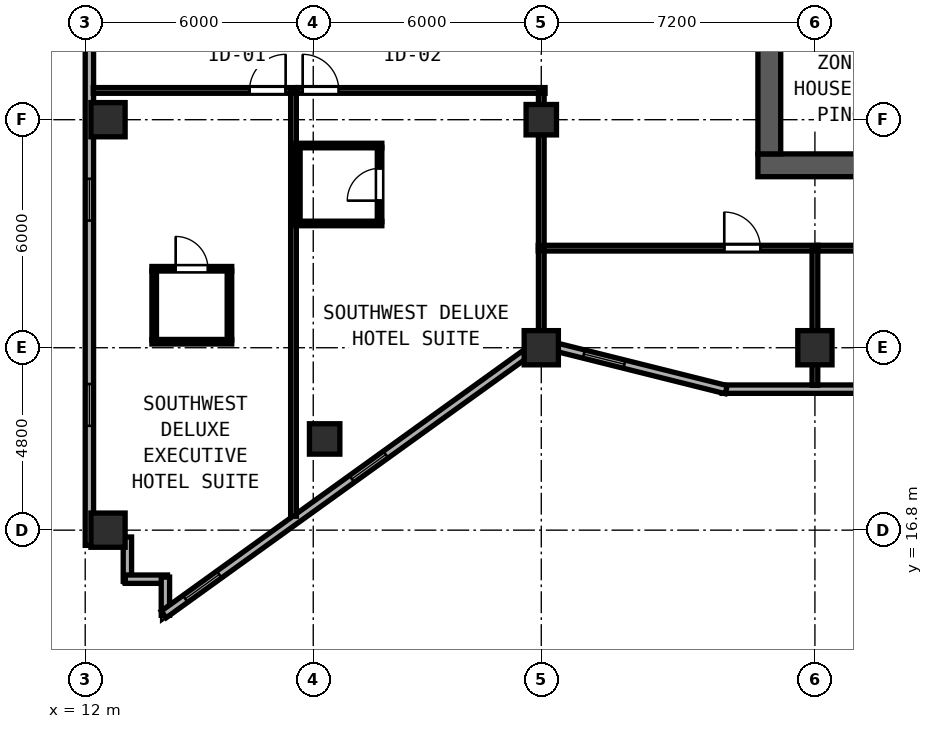
"""IFC4 building model, lengths in metres.
Left out: names, types, materials, properties, quantities, classifications, styles, units other than length and angle.
Written with IfcOpenShell. Run it as: python <this file> out.ifc"""

import sys

from ifc_helpers import new_model, si_unit, direction, frame, frame_2d, origin, origin_2d, place, context, subcontext, project, spatial, rectangle, hollow_rectangle, extrude, element, fill, save


model = new_model("IFC4")
c1 = context("Model", 3, precision=1e-05, world=origin(), true_north=direction((0.0, 1.0)))
c2 = subcontext(c1, "Body", "Model", "MODEL_VIEW")
j1 = project(units=[si_unit("LENGTHUNIT", "METRE"), si_unit("PLANEANGLEUNIT", "RADIAN")], contexts=[c1])
p1 = place(None, origin())
s1 = spatial("IfcSite", under=j1, at=p1, CompositionType="ELEMENT")
p2 = place(p1, origin())
s2 = spatial("IfcBuilding", under=s1, at=p2, CompositionType="ELEMENT")
p3 = place(p2, frame((0.0, 0.0, 176.6)))
s3 = spatial("IfcBuildingStorey", under=s2, at=p3, CompositionType="ELEMENT", Elevation=176.6)
p4 = place(p3, frame((29.7, 26.4, 0.0), z_axis=(0.0, 0.0, 1.0), x_axis=(1.0, 0.0, 0.0)))
e1 = element("IfcWall", 1, at=p4, inside=s3, PredefinedType="SHEAR", context=c2, shape_type="SweptSolid", body=[
    extrude(rectangle(XDim=17.4, YDim=0.6, at=frame_2d((8.7, 0.0))), origin(), (0.0, 0.0, 1.0), 3.62),
])
p5 = place(p4, frame((11.25, 0.0, 0.0), z_axis=(0.0, 0.0, 1.0), x_axis=(-1.0, 0.0, 0.0)))
e2 = element("IfcOpeningElement", 2, at=p5, cuts=e1, PredefinedType="OPENING", context=c2, shape_type="SweptSolid", body=[
    extrude(rectangle(XDim=0.9, YDim=2.1, at=frame_2d((0.45, 1.05))), frame((0.0, 0.31, 0.0), z_axis=(0.0, -1.0, 0.0), x_axis=(1.0, 0.0, 0.0)), (0.0, 0.0, 1.0), 0.62),
])
p6 = place(p3, frame((30.0, 26.7, 0.0), z_axis=(0.0, 0.0, 1.0), x_axis=(0.0, 1.0, 0.0)))
e3 = element("IfcWall", 3, at=p6, inside=s3, PredefinedType="SHEAR", context=c2, shape_type="SweptSolid", body=[
    extrude(rectangle(XDim=4.15, YDim=0.6, at=frame_2d((2.075, 0.0))), origin(), (0.0, 0.0, 1.0), 3.62),
])
for number, where, z_axis, x_axis in (
    (4, (24.0, 21.6, 0.0), (0.0, 0.0, 1.0), (1.0, 0.0, 0.0)),
    (5, (31.2, 21.6, 0.0), (0.0, 0.0, 1.0), (1.0, 0.0, 0.0)),
    (6, (12.6, 16.8, 0.0), (0.0, 0.0, 1.0), (1.0, 0.0, 0.0)),
    (7, (12.6, 27.6, 0.0), (0.0, 0.0, 1.0), (1.0, 0.0, 0.0)),
):
    element("IfcColumn", number, at=place(p3, frame(where, z_axis=z_axis, x_axis=x_axis)), inside=s3, PredefinedType="COLUMN", context=c2, shape_type="SweptSolid", body=[
        extrude(hollow_rectangle(XDim=0.9, YDim=0.9, WallThickness=0.034, at=origin_2d()), origin(), (0.0, 0.0, 1.0), 3.8),
    ])
for number, where, z_axis, x_axis in (
    (8, (24.0, 27.6, 0.0), (0.0, 0.0, 1.0), (1.0, 0.0, 0.0)),
    (9, (18.3, 19.2, 0.0), (0.0, 0.0, 1.0), (1.0, 0.0, 0.0)),
):
    element("IfcColumn", number, at=place(p3, frame(where, z_axis=z_axis, x_axis=x_axis)), inside=s3, PredefinedType="COLUMN", context=c2, shape_type="SweptSolid", body=[
        extrude(hollow_rectangle(XDim=0.8, YDim=0.8, WallThickness=0.03, at=origin_2d()), origin(), (0.0, 0.0, 1.0), 3.8),
    ])
p7 = place(p3, frame((28.759, 20.51, 0.0), z_axis=(0.0, 0.0, 1.0), x_axis=(1.0, 0.0, 0.0)))
e10 = element("IfcWall", 10, at=p7, inside=s3, PredefinedType="SOLIDWALL", context=c2, shape_type="SweptSolid", body=[
    extrude(rectangle(XDim=19.283, YDim=0.22, at=frame_2d((9.642, 0.0))), origin(), (0.0, 0.0, 1.0), 3.62),
])
p8 = place(p7, frame((15.641, 0.0, 0.0), z_axis=(0.0, 0.0, 1.0), x_axis=(-1.0, 0.0, 0.0)))
e11 = element("IfcOpeningElement", 11, at=p8, cuts=e10, PredefinedType="OPENING", context=c2, shape_type="SweptSolid", body=[
    extrude(rectangle(XDim=1.2, YDim=2.15, at=frame_2d((0.6, 1.075))), frame((0.0, 0.12, 0.0), z_axis=(0.0, -1.0, 0.0), x_axis=(1.0, 0.0, 0.0)), (0.0, 0.0, 1.0), 0.24),
])
p9 = place(p3, frame((12.11, 37.545, 0.0), z_axis=(0.0, 0.0, 1.0), x_axis=(0.0, -1.0, 0.0)))
e12 = element("IfcWall", 12, at=p9, inside=s3, PredefinedType="SOLIDWALL", context=c2, shape_type="SweptSolid", body=[
    extrude(rectangle(XDim=21.145, YDim=0.22, at=frame_2d((10.573, 0.0))), origin(), (0.0, 0.0, 1.0), 3.62),
])
p10 = place(p9, frame((0.7, 0.0, 0.85)))
e13 = element("IfcOpeningElement", 13, at=p10, cuts=e12, PredefinedType="OPENING", context=c2, shape_type="SweptSolid", body=[
    extrude(rectangle(XDim=1.1, YDim=1.75, at=frame_2d((0.55, 0.875))), frame((0.0, 0.12, 0.0), z_axis=(0.0, -1.0, 0.0), x_axis=(1.0, 0.0, 0.0)), (0.0, 0.0, 1.0), 0.24),
])
p11 = place(p9, frame((5.83, 0.0, 0.85)))
e14 = element("IfcOpeningElement", 14, at=p11, cuts=e12, PredefinedType="OPENING", context=c2, shape_type="SweptSolid", body=[
    extrude(rectangle(XDim=1.1, YDim=1.75, at=frame_2d((0.55, 0.875))), frame((0.0, 0.12, 0.0), z_axis=(0.0, -1.0, 0.0), x_axis=(1.0, 0.0, 0.0)), (0.0, 0.0, 1.0), 0.24),
])
p12 = place(p9, frame((11.5, 0.0, 0.85)))
e15 = element("IfcOpeningElement", 15, at=p12, cuts=e12, PredefinedType="OPENING", context=c2, shape_type="SweptSolid", body=[
    extrude(rectangle(XDim=1.1, YDim=1.75, at=frame_2d((0.55, 0.875))), frame((0.0, 0.12, 0.0), z_axis=(0.0, -1.0, 0.0), x_axis=(1.0, 0.0, 0.0)), (0.0, 0.0, 1.0), 0.24),
])
p13 = place(p9, frame((16.9, 0.0, 0.85)))
e16 = element("IfcOpeningElement", 16, at=p13, cuts=e12, PredefinedType="OPENING", context=c2, shape_type="SweptSolid", body=[
    extrude(rectangle(XDim=1.1, YDim=1.75, at=frame_2d((0.55, 0.875))), frame((0.0, 0.12, 0.0), z_axis=(0.0, -1.0, 0.0), x_axis=(1.0, 0.0, 0.0)), (0.0, 0.0, 1.0), 0.24),
])
p14 = place(p3, frame((13.11, 16.62, 0.0), z_axis=(0.0, 0.0, 1.0), x_axis=(0.0, -1.0, 0.0)))
e17 = element("IfcWall", 17, at=p14, inside=s3, PredefinedType="SOLIDWALL", context=c2, shape_type="SweptSolid", body=[
    extrude(rectangle(XDim=1.165, YDim=0.22, at=frame_2d((0.583, 0.0))), origin(), (0.0, 0.0, 1.0), 3.62),
])
p15 = place(p3, frame((13.055, 15.51, 0.0), z_axis=(0.0, 0.0, 1.0), x_axis=(1.0, 0.0, 0.0)))
e18 = element("IfcWall", 18, at=p15, inside=s3, PredefinedType="SOLIDWALL", context=c2, shape_type="SweptSolid", body=[
    extrude(rectangle(XDim=1.11, YDim=0.22, at=frame_2d((0.555, 0.0))), origin(), (0.0, 0.0, 1.0), 3.62),
])
p16 = place(p3, frame((14.11, 15.565, 0.0), z_axis=(0.0, 0.0, 1.0), x_axis=(0.0, -1.0, 0.0)))
e19 = element("IfcWall", 19, at=p16, inside=s3, PredefinedType="SOLIDWALL", context=c2, shape_type="SweptSolid", body=[
    extrude(rectangle(XDim=1.005, YDim=0.22, at=frame_2d((0.502, 0.0))), origin(), (0.0, 0.0, 1.0), 3.62),
])
p17 = place(p3, frame((14.065, 14.583, 0.0), z_axis=(0.0, 0.0, 1.0), x_axis=(0.811534737332, 0.58430417601, 0.0)))
e20 = element("IfcWall", 20, at=p17, inside=s3, PredefinedType="SOLIDWALL", context=c2, shape_type="SweptSolid", body=[
    extrude(rectangle(XDim=11.697, YDim=0.22, at=frame_2d((5.849, 0.0))), origin(), (0.0, 0.0, 1.0), 3.215),
])
p18 = place(p17, frame((0.7, 0.0, 0.85)))
e21 = element("IfcOpeningElement", 21, at=p18, cuts=e20, PredefinedType="OPENING", context=c2, shape_type="SweptSolid", body=[
    extrude(rectangle(XDim=1.1, YDim=1.75, at=frame_2d((0.55, 0.875))), frame((0.0, 0.12, 0.0), z_axis=(0.0, -1.0, 0.0), x_axis=(1.0, 0.0, 0.0)), (0.0, 0.0, 1.0), 0.24),
])
p19 = place(p17, frame((6.1, 0.0, 0.85)))
e22 = element("IfcOpeningElement", 22, at=p19, cuts=e20, PredefinedType="OPENING", context=c2, shape_type="SweptSolid", body=[
    extrude(rectangle(XDim=1.1, YDim=1.75, at=frame_2d((0.55, 0.875))), frame((0.0, 0.12, 0.0), z_axis=(0.0, -1.0, 0.0), x_axis=(1.0, 0.0, 0.0)), (0.0, 0.0, 1.0), 0.24),
])
p20 = place(p3, frame((24.442, 21.603, 0.0), z_axis=(0.0, 0.0, 1.0), x_axis=(0.970145648609, -0.242523030833, 0.0)))
e23 = element("IfcWall", 23, at=p20, inside=s3, PredefinedType="SOLIDWALL", context=c2, shape_type="SweptSolid", body=[
    extrude(rectangle(XDim=4.561, YDim=0.22, at=frame_2d((2.281, 0.0))), origin(), (0.0, 0.0, 1.0), 3.215),
])
p21 = place(p20, frame((0.7, 0.0, 0.85)))
e24 = element("IfcOpeningElement", 24, at=p21, cuts=e23, PredefinedType="OPENING", context=c2, shape_type="SweptSolid", body=[
    extrude(rectangle(XDim=1.1, YDim=1.75, at=frame_2d((0.55, 0.875))), frame((0.0, 0.12, 0.0), z_axis=(0.0, -1.0, 0.0), x_axis=(1.0, 0.0, 0.0)), (0.0, 0.0, 1.0), 0.24),
])
p22 = place(p3, frame((23.92, 24.22, 0.0), z_axis=(0.0, 0.0, 1.0), x_axis=(1.0, 0.0, 0.0)))
e25 = element("IfcWall", 25, at=p22, inside=s3, PredefinedType="PARTITIONING", context=c2, shape_type="SweptSolid", body=[
    extrude(rectangle(XDim=7.36, YDim=0.15, at=frame_2d((3.68, 0.0))), origin(), (0.0, 0.0, 1.0), 3.62),
])
p23 = place(p22, frame((5.845, 0.0, 0.0), z_axis=(0.0, 0.0, 1.0), x_axis=(-1.0, 0.0, 0.0)))
e26 = element("IfcOpeningElement", 26, at=p23, cuts=e25, PredefinedType="OPENING", context=c2, shape_type="SweptSolid", body=[
    extrude(rectangle(XDim=0.95, YDim=2.12, at=frame_2d((0.475, 1.06))), frame((0.0, 0.085, 0.0), z_axis=(0.0, -1.0, 0.0), x_axis=(1.0, 0.0, 0.0)), (0.0, 0.0, 1.0), 0.17),
])
p24 = place(p3, frame((24.0, 21.819, 0.0), z_axis=(0.0, 0.0, 1.0), x_axis=(0.0, 1.0, 0.0)))
e27 = element("IfcWall", 27, at=p24, inside=s3, PredefinedType="PARTITIONING", context=c2, shape_type="SweptSolid", body=[
    extrude(rectangle(XDim=2.341, YDim=0.15, at=frame_2d((1.171, 0.0))), origin(), (0.0, 0.0, 1.0), 3.215),
])
p25 = place(p3, frame((31.2, 20.612, 0.0), z_axis=(0.0, 0.0, 1.0), x_axis=(0.0, 1.0, 0.0)))
e28 = element("IfcWall", 28, at=p25, inside=s3, PredefinedType="PARTITIONING", context=c2, shape_type="SweptSolid", body=[
    extrude(rectangle(XDim=3.548, YDim=0.15, at=frame_2d((1.774, 0.0))), origin(), (0.0, 0.0, 1.0), 3.105),
])
p26 = place(p3, frame((31.282, 24.22, 0.0), z_axis=(0.0, 0.0, 1.0), x_axis=(1.0, 0.0, 0.0)))
e29 = element("IfcWall", 29, at=p26, inside=s3, PredefinedType="PARTITIONING", context=c2, shape_type="SweptSolid", body=[
    extrude(rectangle(XDim=14.398, YDim=0.15, at=frame_2d((7.199, 0.0))), origin(), (0.0, 0.0, 1.0), 3.62),
])
p27 = place(p26, frame((7.513, 0.0, 0.0), z_axis=(0.0, 0.0, 1.0), x_axis=(-1.0, 0.0, 0.0)))
e30 = element("IfcOpeningElement", 30, at=p27, cuts=e29, PredefinedType="OPENING", context=c2, shape_type="SweptSolid", body=[
    extrude(rectangle(XDim=0.95, YDim=2.12, at=frame_2d((0.475, 1.06))), frame((0.0, 0.085, 0.0), z_axis=(0.0, -1.0, 0.0), x_axis=(1.0, 0.0, 0.0)), (0.0, 0.0, 1.0), 0.17),
])
p28 = place(p3, frame((12.212, 28.37, 0.0), z_axis=(0.0, 0.0, 1.0), x_axis=(1.0, 0.0, 0.0)))
e31 = element("IfcWall", 31, at=p28, inside=s3, PredefinedType="PARTITIONING", context=c2, shape_type="SweptSolid", body=[
    extrude(rectangle(XDim=5.368, YDim=0.15, at=frame_2d((2.684, 0.0))), origin(), (0.0, 0.0, 1.0), 3.62),
])
p29 = place(p28, frame((5.062, 0.0, 0.0), z_axis=(0.0, 0.0, 1.0), x_axis=(-1.0, 0.0, 0.0)))
e32 = element("IfcOpeningElement", 32, at=p29, cuts=e31, PredefinedType="OPENING", context=c2, shape_type="SweptSolid", body=[
    extrude(rectangle(XDim=0.95, YDim=2.18, at=frame_2d((0.475, 1.09))), frame((0.0, 0.085, 0.0), z_axis=(0.0, -1.0, 0.0), x_axis=(1.0, 0.0, 0.0)), (0.0, 0.0, 1.0), 0.17),
])
p30 = place(p3, frame((17.48, 17.167, 0.0), z_axis=(0.0, 0.0, 1.0), x_axis=(0.0, 1.0, 0.0)))
e33 = element("IfcWall", 33, at=p30, inside=s3, PredefinedType="PARTITIONING", context=c2, shape_type="SweptSolid", body=[
    extrude(rectangle(XDim=11.143, YDim=0.15, at=frame_2d((5.572, 0.0))), origin(), (0.0, 0.0, 1.0), 3.62),
])
p31 = place(p3, frame((13.755, 23.678, 0.0), z_axis=(0.0, 0.0, 1.0), x_axis=(1.0, 0.0, 0.0)))
e34 = element("IfcWall", 34, at=p31, inside=s3, PredefinedType="PARTITIONING", context=c2, shape_type="SweptSolid", body=[
    extrude(rectangle(XDim=2.1, YDim=0.12, at=frame_2d((1.05, 0.0))), origin(), (0.0, 0.0, 1.0), 3.62),
])
p32 = place(p31, frame((1.475, 0.0, 0.0), z_axis=(0.0, 0.0, 1.0), x_axis=(-1.0, 0.0, 0.0)))
e35 = element("IfcOpeningElement", 35, at=p32, cuts=e34, PredefinedType="OPENING", context=c2, shape_type="SweptSolid", body=[
    extrude(rectangle(XDim=0.85, YDim=2.1, at=frame_2d((0.425, 1.05))), frame((0.0, 0.07, 0.0), z_axis=(0.0, -1.0, 0.0), x_axis=(1.0, 0.0, 0.0)), (0.0, 0.0, 1.0), 0.14),
])
p33 = place(p3, frame((13.755, 21.758, 0.0), z_axis=(0.0, 0.0, 1.0), x_axis=(1.0, 0.0, 0.0)))
e36 = element("IfcWall", 36, at=p33, inside=s3, PredefinedType="PARTITIONING", context=c2, shape_type="SweptSolid", body=[
    extrude(rectangle(XDim=2.1, YDim=0.12, at=frame_2d((1.05, 0.0))), origin(), (0.0, 0.0, 1.0), 3.62),
])
for number, where, z_axis, x_axis in (
    (37, (13.815, 21.803, 0.0), (0.0, 0.0, 1.0), (0.0, 1.0, 0.0)),
    (38, (15.795, 21.803, 0.0), (0.0, 0.0, 1.0), (0.0, 1.0, 0.0)),
):
    element("IfcWall", number, at=place(p3, frame(where, z_axis=z_axis, x_axis=x_axis)), inside=s3, PredefinedType="PARTITIONING", context=c2, shape_type="SweptSolid", body=[
        extrude(rectangle(XDim=1.83, YDim=0.12, at=frame_2d((0.915, 0.0))), origin(), (0.0, 0.0, 1.0), 3.62),
    ])
p34 = place(p3, frame((17.582, 28.37, 0.0), z_axis=(0.0, 0.0, 1.0), x_axis=(1.0, 0.0, 0.0)))
e39 = element("IfcWall", 39, at=p34, inside=s3, PredefinedType="PARTITIONING", context=c2, shape_type="SweptSolid", body=[
    extrude(rectangle(XDim=6.518, YDim=0.15, at=frame_2d((3.259, 0.0))), origin(), (0.0, 0.0, 1.0), 3.62),
])
p35 = place(p34, frame((1.09, 0.0, 0.0), z_axis=(0.0, 0.0, 1.0), x_axis=(-1.0, 0.0, 0.0)))
e40 = element("IfcOpeningElement", 40, at=p35, cuts=e39, PredefinedType="OPENING", context=c2, shape_type="SweptSolid", body=[
    extrude(rectangle(XDim=0.95, YDim=2.18, at=frame_2d((0.475, 1.09))), frame((0.0, 0.085, 0.0), z_axis=(0.0, -1.0, 0.0), x_axis=(1.0, 0.0, 0.0)), (0.0, 0.0, 1.0), 0.17),
])
p36 = place(p3, frame((24.0, 24.28, 0.0), z_axis=(0.0, 0.0, 1.0), x_axis=(0.0, 1.0, 0.0)))
e41 = element("IfcWall", 41, at=p36, inside=s3, PredefinedType="PARTITIONING", context=c2, shape_type="SweptSolid", body=[
    extrude(rectangle(XDim=4.03, YDim=0.15, at=frame_2d((2.015, 0.0))), origin(), (0.0, 0.0, 1.0), 3.215),
])
p37 = place(p3, frame((17.54, 26.92, 0.0), z_axis=(0.0, 0.0, 1.0), x_axis=(1.0, 0.0, 0.0)))
e42 = element("IfcWall", 42, at=p37, inside=s3, PredefinedType="PARTITIONING", context=c2, shape_type="SweptSolid", body=[
    extrude(rectangle(XDim=2.265, YDim=0.12, at=frame_2d((1.132, 0.0))), origin(), (0.0, 0.0, 1.0), 3.62),
])
p38 = place(p3, frame((17.54, 24.87, 0.0), z_axis=(0.0, 0.0, 1.0), x_axis=(1.0, 0.0, 0.0)))
e43 = element("IfcWall", 43, at=p38, inside=s3, PredefinedType="PARTITIONING", context=c2, shape_type="SweptSolid", body=[
    extrude(rectangle(XDim=2.265, YDim=0.12, at=frame_2d((1.132, 0.0))), origin(), (0.0, 0.0, 1.0), 3.255),
])
p39 = place(p3, frame((17.595, 24.915, 0.0), z_axis=(0.0, 0.0, 1.0), x_axis=(0.0, 1.0, 0.0)))
e44 = element("IfcWall", 44, at=p39, inside=s3, PredefinedType="PARTITIONING", context=c2, shape_type="SweptSolid", body=[
    extrude(rectangle(XDim=1.96, YDim=0.12, at=frame_2d((0.98, 0.0))), origin(), (0.0, 0.0, 1.0), 3.62),
])
p40 = place(p3, frame((19.745, 24.915, 0.0), z_axis=(0.0, 0.0, 1.0), x_axis=(0.0, 1.0, 0.0)))
e45 = element("IfcWall", 45, at=p40, inside=s3, PredefinedType="PARTITIONING", context=c2, shape_type="SweptSolid", body=[
    extrude(rectangle(XDim=1.96, YDim=0.12, at=frame_2d((0.98, 0.0))), origin(), (0.0, 0.0, 1.0), 3.62),
])
p41 = place(p40, frame((0.555, 0.0, 0.0)))
e46 = element("IfcOpeningElement", 46, at=p41, cuts=e45, PredefinedType="OPENING", context=c2, shape_type="SweptSolid", body=[
    extrude(rectangle(XDim=0.85, YDim=2.1, at=frame_2d((0.425, 1.05))), frame((0.0, 0.07, 0.0), z_axis=(0.0, -1.0, 0.0), x_axis=(1.0, 0.0, 0.0)), (0.0, 0.0, 1.0), 0.14),
])
p42 = place(p12, origin())
e47 = element("IfcWindow", 47, at=p42, inside=s3, PartitioningType="SINGLE_PANEL", PredefinedType="WINDOW", context=c2, shape_type="SweptSolid", body=[
    extrude(rectangle(XDim=1.1, YDim=1.75, at=frame_2d((0.55, 0.875))), frame((0.0, 0.03, 0.0), z_axis=(0.0, -1.0, 0.0), x_axis=(1.0, 0.0, 0.0)), (0.0, 0.0, 1.0), 0.06),
])
fill(e15, e47)
p43 = place(p13, origin())
e48 = element("IfcWindow", 48, at=p43, inside=s3, PartitioningType="SINGLE_PANEL", PredefinedType="WINDOW", context=c2, shape_type="SweptSolid", body=[
    extrude(rectangle(XDim=1.1, YDim=1.75, at=frame_2d((0.55, 0.875))), frame((0.0, 0.03, 0.0), z_axis=(0.0, -1.0, 0.0), x_axis=(1.0, 0.0, 0.0)), (0.0, 0.0, 1.0), 0.06),
])
fill(e16, e48)
p44 = place(p18, origin())
e49 = element("IfcWindow", 49, at=p44, inside=s3, PartitioningType="SINGLE_PANEL", PredefinedType="WINDOW", context=c2, shape_type="SweptSolid", body=[
    extrude(rectangle(XDim=1.1, YDim=1.75, at=frame_2d((0.55, 0.875))), frame((0.0, 0.03, 0.0), z_axis=(0.0, -1.0, 0.0), x_axis=(1.0, 0.0, 0.0)), (0.0, 0.0, 1.0), 0.06),
])
fill(e21, e49)
p45 = place(p19, origin())
e50 = element("IfcWindow", 50, at=p45, inside=s3, PartitioningType="SINGLE_PANEL", PredefinedType="WINDOW", context=c2, shape_type="SweptSolid", body=[
    extrude(rectangle(XDim=1.1, YDim=1.75, at=frame_2d((0.55, 0.875))), frame((0.0, 0.03, 0.0), z_axis=(0.0, -1.0, 0.0), x_axis=(1.0, 0.0, 0.0)), (0.0, 0.0, 1.0), 0.06),
])
fill(e22, e50)
p46 = place(p21, origin())
e51 = element("IfcWindow", 51, at=p46, inside=s3, PartitioningType="SINGLE_PANEL", PredefinedType="WINDOW", context=c2, shape_type="SweptSolid", body=[
    extrude(rectangle(XDim=1.1, YDim=1.75, at=frame_2d((0.55, 0.875))), frame((0.0, 0.03, 0.0), z_axis=(0.0, -1.0, 0.0), x_axis=(1.0, 0.0, 0.0)), (0.0, 0.0, 1.0), 0.06),
])
fill(e24, e51)
p47 = place(p23, origin())
e52 = element("IfcDoor", 52, at=p47, inside=s3, OperationType="SINGLE_SWING_RIGHT", PredefinedType="DOOR", context=c2, shape_type="SweptSolid", body=[
    extrude(rectangle(XDim=0.95, YDim=2.12, at=frame_2d((0.475, 1.06))), frame((0.0, 0.025, 0.0), z_axis=(0.0, -1.0, 0.0), x_axis=(1.0, 0.0, 0.0)), (0.0, 0.0, 1.0), 0.05),
])
fill(e26, e52)
p48 = place(p29, origin())
e53 = element("IfcDoor", 53, at=p48, inside=s3, OperationType="SINGLE_SWING_LEFT", PredefinedType="DOOR", context=c2, shape_type="SweptSolid", body=[
    extrude(rectangle(XDim=0.95, YDim=2.18, at=frame_2d((0.475, 1.09))), frame((0.0, 0.025, 0.0), z_axis=(0.0, -1.0, 0.0), x_axis=(1.0, 0.0, 0.0)), (0.0, 0.0, 1.0), 0.05),
])
fill(e32, e53)
p49 = place(p32, origin())
e54 = element("IfcDoor", 54, at=p49, inside=s3, OperationType="SINGLE_SWING_RIGHT", PredefinedType="DOOR", context=c2, shape_type="SweptSolid", body=[
    extrude(rectangle(XDim=0.85, YDim=2.1, at=frame_2d((0.425, 1.05))), frame((0.0, 0.025, 0.0), z_axis=(0.0, -1.0, 0.0), x_axis=(1.0, 0.0, 0.0)), (0.0, 0.0, 1.0), 0.05),
])
fill(e35, e54)
p50 = place(p35, origin())
e55 = element("IfcDoor", 55, at=p50, inside=s3, OperationType="SINGLE_SWING_RIGHT", PredefinedType="DOOR", context=c2, shape_type="SweptSolid", body=[
    extrude(rectangle(XDim=0.95, YDim=2.18, at=frame_2d((0.475, 1.09))), frame((0.0, 0.025, 0.0), z_axis=(0.0, -1.0, 0.0), x_axis=(1.0, 0.0, 0.0)), (0.0, 0.0, 1.0), 0.05),
])
fill(e40, e55)
p51 = place(p41, origin())
e56 = element("IfcDoor", 56, at=p51, inside=s3, OperationType="SINGLE_SWING_LEFT", PredefinedType="DOOR", context=c2, shape_type="SweptSolid", body=[
    extrude(rectangle(XDim=0.85, YDim=2.1, at=frame_2d((0.425, 1.05))), frame((0.0, 0.025, 0.0), z_axis=(0.0, -1.0, 0.0), x_axis=(1.0, 0.0, 0.0)), (0.0, 0.0, 1.0), 0.05),
])
fill(e46, e56)
save(model, sys.argv[1])
